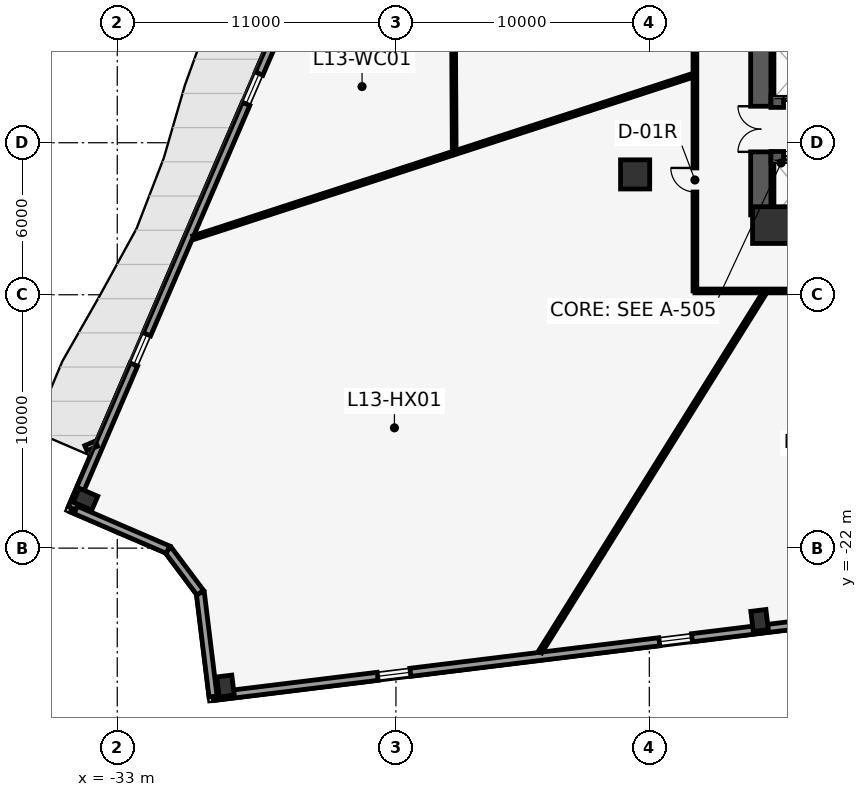
"""IFC4 building model, lengths in metres.
Left out: names, types, materials, properties, quantities, classifications, styles, units other than length and angle.
Written with IfcOpenShell. Run it as: python <this file> out.ifc"""

import sys

from ifc_helpers import new_model, si_unit, direction, frame, frame_2d, origin, origin_2d, place, context, subcontext, project, spatial, rectangle, hollow_rectangle, extrude, element, fill, save


model = new_model("IFC4")
c1 = context("Model", 3, precision=1e-05, world=origin(), true_north=direction((0.0, 1.0)))
c2 = subcontext(c1, "Body", "Model", "MODEL_VIEW")
j1 = project(units=[si_unit("LENGTHUNIT", "METRE"), si_unit("PLANEANGLEUNIT", "RADIAN")], contexts=[c1])
p1 = place(None, origin())
s1 = spatial("IfcSite", under=j1, at=p1, CompositionType="ELEMENT")
p2 = place(p1, origin())
s2 = spatial("IfcBuilding", under=s1, at=p2, CompositionType="ELEMENT")
p3 = place(p2, frame((0.0, 0.0, 62.4)))
s3 = spatial("IfcBuildingStorey", under=s2, at=p3, CompositionType="ELEMENT", Elevation=62.4)
p4 = place(p3, frame((-7.6, -8.85, 0.0), z_axis=(0.0, 0.0, 1.0), x_axis=(0.0, 1.0, 0.0)))
e1 = element("IfcWall", 1, at=p4, inside=s3, PredefinedType="SHEAR", context=c2, shape_type="SweptSolid", body=[
    extrude(rectangle(XDim=8.95, YDim=0.8, at=frame_2d((4.475, 0.0))), origin(), (0.0, 0.0, 1.0), 4.35),
])
p5 = place(p4, frame((2.49, 0.0, 0.0)))
e2 = element("IfcOpeningElement", 2, at=p5, cuts=e1, PredefinedType="OPENING", context=c2, shape_type="SweptSolid", body=[
    extrude(rectangle(XDim=1.8, YDim=2.2, at=frame_2d((0.9, 1.1))), frame((0.0, 0.41, 0.0), z_axis=(0.0, -1.0, 0.0), x_axis=(1.0, 0.0, 0.0)), (0.0, 0.0, 1.0), 0.82),
])
p6 = place(p4, frame((7.4, 0.0, 0.0)))
e3 = element("IfcOpeningElement", 3, at=p6, cuts=e1, PredefinedType="OPENING", context=c2, shape_type="SweptSolid", body=[
    extrude(rectangle(XDim=1.2, YDim=2.15, at=frame_2d((0.6, 1.075))), frame((0.0, 0.41, 0.0), z_axis=(0.0, -1.0, 0.0), x_axis=(1.0, 0.0, 0.0)), (0.0, 0.0, 1.0), 0.82),
])
p7 = place(p3, frame((-7.6, -9.25, 0.0), z_axis=(0.0, 0.0, 1.0), x_axis=(1.0, 0.0, 0.0)))
e4 = element("IfcWall", 4, at=p7, inside=s3, PredefinedType="SHEAR", context=c2, shape_type="SweptSolid", body=[
    extrude(rectangle(XDim=15.2, YDim=0.8, at=frame_2d((7.6, 0.0))), origin(), (0.0, 0.0, 1.0), 4.35),
])
p8 = place(p3, frame((-7.2, -4.38, 0.0), z_axis=(0.0, 0.0, 1.0), x_axis=(1.0, 0.0, 0.0)))
e5 = element("IfcWall", 5, at=p8, inside=s3, PredefinedType="SHEAR", context=c2, shape_type="SweptSolid", body=[
    extrude(rectangle(XDim=14.4, YDim=0.45, at=frame_2d((7.2, 0.0))), origin(), (0.0, 0.0, 1.0), 4.35),
])
p9 = place(p8, frame((0.5, 0.0, 0.0)))
e6 = element("IfcOpeningElement", 6, at=p9, cuts=e5, PredefinedType="OPENING", context=c2, shape_type="SweptSolid", body=[
    extrude(rectangle(XDim=1.1, YDim=2.2, at=frame_2d((0.55, 1.1))), frame((0.0, 0.235, 0.0), z_axis=(0.0, -1.0, 0.0), x_axis=(1.0, 0.0, 0.0)), (0.0, 0.0, 1.0), 0.47),
])
p10 = place(p8, frame((2.55, 0.0, 0.0)))
e7 = element("IfcOpeningElement", 7, at=p10, cuts=e5, PredefinedType="OPENING", context=c2, shape_type="SweptSolid", body=[
    extrude(rectangle(XDim=1.1, YDim=2.2, at=frame_2d((0.55, 1.1))), frame((0.0, 0.235, 0.0), z_axis=(0.0, -1.0, 0.0), x_axis=(1.0, 0.0, 0.0)), (0.0, 0.0, 1.0), 0.47),
])
p11 = place(p8, frame((4.6, 0.0, 0.0)))
e8 = element("IfcOpeningElement", 8, at=p11, cuts=e5, PredefinedType="OPENING", context=c2, shape_type="SweptSolid", body=[
    extrude(rectangle(XDim=1.1, YDim=2.2, at=frame_2d((0.55, 1.1))), frame((0.0, 0.235, 0.0), z_axis=(0.0, -1.0, 0.0), x_axis=(1.0, 0.0, 0.0)), (0.0, 0.0, 1.0), 0.47),
])
p12 = place(p8, frame((6.3, 0.0, 0.0)))
e9 = element("IfcOpeningElement", 9, at=p12, cuts=e5, PredefinedType="OPENING", context=c2, shape_type="SweptSolid", body=[
    extrude(rectangle(XDim=1.1, YDim=2.2, at=frame_2d((0.55, 1.1))), frame((0.0, 0.235, 0.0), z_axis=(0.0, -1.0, 0.0), x_axis=(1.0, 0.0, 0.0)), (0.0, 0.0, 1.0), 0.47),
])
p13 = place(p3, frame((-7.2, -6.57, 0.0), z_axis=(0.0, 0.0, 1.0), x_axis=(1.0, 0.0, 0.0)))
e10 = element("IfcWall", 10, at=p13, inside=s3, PredefinedType="SHEAR", context=c2, shape_type="SweptSolid", body=[
    extrude(rectangle(XDim=14.4, YDim=0.45, at=frame_2d((7.2, 0.0))), origin(), (0.0, 0.0, 1.0), 4.35),
])
p14 = place(p13, frame((0.5, 0.0, 0.0)))
e11 = element("IfcOpeningElement", 11, at=p14, cuts=e10, PredefinedType="OPENING", context=c2, shape_type="SweptSolid", body=[
    extrude(rectangle(XDim=1.1, YDim=2.2, at=frame_2d((0.55, 1.1))), frame((0.0, 0.235, 0.0), z_axis=(0.0, -1.0, 0.0), x_axis=(1.0, 0.0, 0.0)), (0.0, 0.0, 1.0), 0.47),
])
p15 = place(p13, frame((2.55, 0.0, 0.0)))
e12 = element("IfcOpeningElement", 12, at=p15, cuts=e10, PredefinedType="OPENING", context=c2, shape_type="SweptSolid", body=[
    extrude(rectangle(XDim=1.1, YDim=2.2, at=frame_2d((0.55, 1.1))), frame((0.0, 0.235, 0.0), z_axis=(0.0, -1.0, 0.0), x_axis=(1.0, 0.0, 0.0)), (0.0, 0.0, 1.0), 0.47),
])
p16 = place(p13, frame((4.6, 0.0, 0.0)))
e13 = element("IfcOpeningElement", 13, at=p16, cuts=e10, PredefinedType="OPENING", context=c2, shape_type="SweptSolid", body=[
    extrude(rectangle(XDim=1.1, YDim=2.2, at=frame_2d((0.55, 1.1))), frame((0.0, 0.235, 0.0), z_axis=(0.0, -1.0, 0.0), x_axis=(1.0, 0.0, 0.0)), (0.0, 0.0, 1.0), 0.47),
])
p17 = place(p13, frame((6.3, 0.0, 0.0)))
e14 = element("IfcOpeningElement", 14, at=p17, cuts=e10, PredefinedType="OPENING", context=c2, shape_type="SweptSolid", body=[
    extrude(rectangle(XDim=1.1, YDim=2.2, at=frame_2d((0.55, 1.1))), frame((0.0, 0.235, 0.0), z_axis=(0.0, -1.0, 0.0), x_axis=(1.0, 0.0, 0.0)), (0.0, 0.0, 1.0), 0.47),
])
p18 = place(p13, frame((12.91, 0.0, 0.0)))
e15 = element("IfcOpeningElement", 15, at=p18, cuts=e10, PredefinedType="OPENING", context=c2, shape_type="SweptSolid", body=[
    extrude(rectangle(XDim=0.88, YDim=2.15, at=frame_2d((0.44, 1.075))), frame((0.0, 0.235, 0.0), z_axis=(0.0, -1.0, 0.0), x_axis=(1.0, 0.0, 0.0)), (0.0, 0.0, 1.0), 0.47),
])
p19 = place(p3, frame((-7.2, -9.25, 0.0), z_axis=(0.0, 0.0, 1.0), x_axis=(1.0, 0.0, 0.0)))
e16 = element("IfcColumn", 16, at=p19, inside=s3, PredefinedType="COLUMN", context=c2, shape_type="SweptSolid", body=[
    extrude(rectangle(XDim=1.45, YDim=1.45, at=origin_2d()), origin(), (0.0, 0.0, 1.0), 4.6),
])
p20 = place(p3, frame((-12.56, -7.25, 0.0), z_axis=(0.0, 0.0, 1.0), x_axis=(1.0, 0.0, 0.0)))
e17 = element("IfcColumn", 17, at=p20, inside=s3, PredefinedType="COLUMN", context=c2, shape_type="SweptSolid", body=[
    extrude(rectangle(XDim=1.15, YDim=1.15, at=origin_2d()), origin(), (0.0, 0.0, 1.0), 4.6),
])
for number, where, z_axis, x_axis in (
    (18, (-34.255, -20.07, 0.0), (0.0, 0.0, 1.0), (0.396, 0.918, 0.0)),
    (19, (-28.728, -27.444, 0.0), (0.0, 0.0, 1.0), (0.993, 0.122, 0.0)),
    (20, (-7.647, -24.856, 0.0), (0.0, 0.0, 1.0), (0.993, 0.122, 0.0)),
):
    element("IfcColumn", number, at=place(p3, frame(where, z_axis=z_axis, x_axis=x_axis)), inside=s3, PredefinedType="COLUMN", context=c2, shape_type="SweptSolid", body=[
        extrude(hollow_rectangle(XDim=0.6, YDim=0.8, WallThickness=0.05, at=origin_2d()), origin(), (0.0, 0.0, 1.0), 4.6),
    ])
p21 = place(p3, frame((35.091, -19.961, 0.0), z_axis=(0.0, 0.0, 1.0), x_axis=(-0.992546286146, -0.121868247946, 0.0)))
e21 = element("IfcWall", 21, at=p21, inside=s3, PredefinedType="STANDARD", context=c2, shape_type="SweptSolid", body=[
    extrude(rectangle(XDim=64.793, YDim=0.32, at=frame_2d((32.396, 0.0))), origin(), (0.0, 0.0, 1.0), 4.35),
])
p22 = place(p21, frame((12.147, 0.0, 0.85)))
e22 = element("IfcOpeningElement", 22, at=p22, cuts=e21, PredefinedType="OPENING", context=c2, shape_type="SweptSolid", body=[
    extrude(rectangle(XDim=1.3, YDim=2.1, at=frame_2d((0.65, 1.05))), frame((0.0, 0.17, 0.0), z_axis=(0.0, -1.0, 0.0), x_axis=(1.0, 0.0, 0.0)), (0.0, 0.0, 1.0), 0.34),
])
p23 = place(p21, frame((17.747, 0.0, 0.85)))
e23 = element("IfcOpeningElement", 23, at=p23, cuts=e21, PredefinedType="OPENING", context=c2, shape_type="SweptSolid", body=[
    extrude(rectangle(XDim=1.3, YDim=2.1, at=frame_2d((0.65, 1.05))), frame((0.0, 0.17, 0.0), z_axis=(0.0, -1.0, 0.0), x_axis=(1.0, 0.0, 0.0)), (0.0, 0.0, 1.0), 0.34),
])
p24 = place(p21, frame((45.747, 0.0, 0.85)))
e24 = element("IfcOpeningElement", 24, at=p24, cuts=e21, PredefinedType="OPENING", context=c2, shape_type="SweptSolid", body=[
    extrude(rectangle(XDim=1.3, YDim=2.1, at=frame_2d((0.65, 1.05))), frame((0.0, 0.17, 0.0), z_axis=(0.0, -1.0, 0.0), x_axis=(1.0, 0.0, 0.0)), (0.0, 0.0, 1.0), 0.34),
])
p25 = place(p21, frame((56.947, 0.0, 0.85)))
e25 = element("IfcOpeningElement", 25, at=p25, cuts=e21, PredefinedType="OPENING", context=c2, shape_type="SweptSolid", body=[
    extrude(rectangle(XDim=1.3, YDim=2.1, at=frame_2d((0.65, 1.05))), frame((0.0, 0.17, 0.0), z_axis=(0.0, -1.0, 0.0), x_axis=(1.0, 0.0, 0.0)), (0.0, 0.0, 1.0), 0.34),
])
p26 = place(p3, frame((-29.219, -27.857, 0.0), z_axis=(0.0, 0.0, 1.0), x_axis=(-0.121887213021, 0.992543957365, 0.0)))
e26 = element("IfcWall", 26, at=p26, inside=s3, PredefinedType="STANDARD", context=c2, shape_type="SweptSolid", body=[
    extrude(rectangle(XDim=4.128, YDim=0.32, at=frame_2d((2.064, 0.0))), origin(), (0.0, 0.0, 1.0), 4.35),
])
p27 = place(p3, frame((-29.723, -23.76, 0.0), z_axis=(0.0, 0.0, 1.0), x_axis=(-0.59977911486, 0.800165616218, 0.0)))
e27 = element("IfcWall", 27, at=p27, inside=s3, PredefinedType="STANDARD", context=c2, shape_type="SweptSolid", body=[
    extrude(rectangle(XDim=2.122, YDim=0.32, at=frame_2d((1.061, 0.0))), origin(), (0.0, 0.0, 1.0), 4.35),
])
p28 = place(p3, frame((-30.996, -22.062, 0.0), z_axis=(0.0, 0.0, 1.0), x_axis=(-0.918504494871, 0.395410537165, 0.0)))
e28 = element("IfcWall", 28, at=p28, inside=s3, PredefinedType="STANDARD", context=c2, shape_type="SweptSolid", body=[
    extrude(rectangle(XDim=4.128, YDim=0.32, at=frame_2d((2.064, 0.0))), origin(), (0.0, 0.0, 1.0), 4.35),
])
p29 = place(p3, frame((-34.787, -20.429, 0.0), z_axis=(0.0, 0.0, 1.0), x_axis=(0.395418293843, 0.91850115563, 0.0)))
e29 = element("IfcWall", 29, at=p29, inside=s3, PredefinedType="STANDARD", context=c2, shape_type="SweptSolid", body=[
    extrude(rectangle(XDim=64.058, YDim=0.32, at=frame_2d((32.029, 0.0))), origin(), (0.0, 0.0, 1.0), 4.35),
])
p30 = place(p29, frame((23.542, 0.0, 0.0)))
e30 = element("IfcOpeningElement", 30, at=p30, cuts=e29, PredefinedType="OPENING", context=c2, shape_type="SweptSolid", body=[
    extrude(rectangle(XDim=1.6, YDim=2.2, at=frame_2d((0.8, 1.1))), frame((0.0, 0.17, 0.0), z_axis=(0.0, -1.0, 0.0), x_axis=(1.0, 0.0, 0.0)), (0.0, 0.0, 1.0), 0.34),
])
p31 = place(p29, frame((6.179, 0.0, 0.85)))
e31 = element("IfcOpeningElement", 31, at=p31, cuts=e29, PredefinedType="OPENING", context=c2, shape_type="SweptSolid", body=[
    extrude(rectangle(XDim=1.3, YDim=2.1, at=frame_2d((0.65, 1.05))), frame((0.0, 0.17, 0.0), z_axis=(0.0, -1.0, 0.0), x_axis=(1.0, 0.0, 0.0)), (0.0, 0.0, 1.0), 0.34),
])
p32 = place(p29, frame((17.379, 0.0, 0.85)))
e32 = element("IfcOpeningElement", 32, at=p32, cuts=e29, PredefinedType="OPENING", context=c2, shape_type="SweptSolid", body=[
    extrude(rectangle(XDim=1.3, YDim=2.1, at=frame_2d((0.65, 1.05))), frame((0.0, 0.17, 0.0), z_axis=(0.0, -1.0, 0.0), x_axis=(1.0, 0.0, 0.0)), (0.0, 0.0, 1.0), 0.34),
])
p33 = place(p29, frame((45.379, 0.0, 0.85)))
e33 = element("IfcOpeningElement", 33, at=p33, cuts=e29, PredefinedType="OPENING", context=c2, shape_type="SweptSolid", body=[
    extrude(rectangle(XDim=1.3, YDim=2.1, at=frame_2d((0.65, 1.05))), frame((0.0, 0.17, 0.0), z_axis=(0.0, -1.0, 0.0), x_axis=(1.0, 0.0, 0.0)), (0.0, 0.0, 1.0), 0.34),
])
p34 = place(p29, frame((50.979, 0.0, 0.85)))
e34 = element("IfcOpeningElement", 34, at=p34, cuts=e29, PredefinedType="OPENING", context=c2, shape_type="SweptSolid", body=[
    extrude(rectangle(XDim=1.3, YDim=2.1, at=frame_2d((0.65, 1.05))), frame((0.0, 0.17, 0.0), z_axis=(0.0, -1.0, 0.0), x_axis=(1.0, 0.0, 0.0)), (0.0, 0.0, 1.0), 0.34),
])
p35 = place(p29, frame((56.579, 0.0, 0.85)))
e35 = element("IfcOpeningElement", 35, at=p35, cuts=e29, PredefinedType="OPENING", context=c2, shape_type="SweptSolid", body=[
    extrude(rectangle(XDim=1.3, YDim=2.1, at=frame_2d((0.65, 1.05))), frame((0.0, 0.17, 0.0), z_axis=(0.0, -1.0, 0.0), x_axis=(1.0, 0.0, 0.0)), (0.0, 0.0, 1.0), 0.34),
])
p36 = place(p3, frame((10.2, -11.85, 0.0), z_axis=(0.0, 0.0, 1.0), x_axis=(-1.0, 0.0, 0.0)))
e36 = element("IfcWall", 36, at=p36, inside=s3, PredefinedType="PARTITIONING", context=c2, shape_type="SweptSolid", body=[
    extrude(rectangle(XDim=20.4, YDim=0.15, at=frame_2d((10.2, 0.0))), origin(), (0.0, 0.0, 1.0), 4.35),
])
p37 = place(p36, frame((12.406, 0.0, 0.0)))
e37 = element("IfcOpeningElement", 37, at=p37, cuts=e36, PredefinedType="OPENING", context=c2, shape_type="SweptSolid", body=[
    extrude(rectangle(XDim=0.95, YDim=2.15, at=frame_2d((0.475, 1.075))), frame((0.0, 0.085, 0.0), z_axis=(0.0, -1.0, 0.0), x_axis=(1.0, 0.0, 0.0)), (0.0, 0.0, 1.0), 0.17),
])
p38 = place(p36, frame((3.701, 0.0, 0.0)))
e38 = element("IfcOpeningElement", 38, at=p38, cuts=e36, PredefinedType="OPENING", context=c2, shape_type="SweptSolid", body=[
    extrude(rectangle(XDim=0.95, YDim=2.15, at=frame_2d((0.475, 1.075))), frame((0.0, 0.085, 0.0), z_axis=(0.0, -1.0, 0.0), x_axis=(1.0, 0.0, 0.0)), (0.0, 0.0, 1.0), 0.17),
])
p39 = place(p3, frame((-10.2, -11.85, 0.0), z_axis=(0.0, 0.0, 1.0), x_axis=(0.0, 1.0, 0.0)))
e39 = element("IfcWall", 39, at=p39, inside=s3, PredefinedType="PARTITIONING", context=c2, shape_type="SweptSolid", body=[
    extrude(rectangle(XDim=24.0, YDim=0.15, at=frame_2d((12.0, 0.0))), origin(), (0.0, 0.0, 1.0), 4.35),
])
p40 = place(p39, frame((11.995, 0.0, 0.0)))
e40 = element("IfcOpeningElement", 40, at=p40, cuts=e39, PredefinedType="OPENING", context=c2, shape_type="SweptSolid", body=[
    extrude(rectangle(XDim=0.95, YDim=2.15, at=frame_2d((0.475, 1.075))), frame((0.0, 0.085, 0.0), z_axis=(0.0, -1.0, 0.0), x_axis=(1.0, 0.0, 0.0)), (0.0, 0.0, 1.0), 0.17),
])
p41 = place(p39, frame((3.905, 0.0, 0.0)))
e41 = element("IfcOpeningElement", 41, at=p41, cuts=e39, PredefinedType="OPENING", context=c2, shape_type="SweptSolid", body=[
    extrude(rectangle(XDim=0.95, YDim=2.15, at=frame_2d((0.475, 1.075))), frame((0.0, 0.085, 0.0), z_axis=(0.0, -1.0, 0.0), x_axis=(1.0, 0.0, 0.0)), (0.0, 0.0, 1.0), 0.17),
])
p42 = place(p39, frame((19.615, 0.0, 0.0)))
e42 = element("IfcOpeningElement", 42, at=p42, cuts=e39, PredefinedType="OPENING", context=c2, shape_type="SweptSolid", body=[
    extrude(rectangle(XDim=0.95, YDim=2.15, at=frame_2d((0.475, 1.075))), frame((0.0, 0.085, 0.0), z_axis=(0.0, -1.0, 0.0), x_axis=(1.0, 0.0, 0.0)), (0.0, 0.0, 1.0), 0.17),
])
p43 = place(p3, frame((-10.305, -3.348, 0.0), z_axis=(0.0, 0.0, 1.0), x_axis=(-0.951058846739, -0.309009821915, 0.0)))
e43 = element("IfcWall", 43, at=p43, inside=s3, PredefinedType="PARTITIONING", context=c2, shape_type="SweptSolid", body=[
    extrude(rectangle(XDim=20.706, YDim=0.15, at=frame_2d((10.353, 0.0))), origin(), (0.0, 0.0, 1.0), 4.35),
])
p44 = place(p3, frame((-7.47, -11.955, 0.0), z_axis=(0.0, 0.0, 1.0), x_axis=(-0.529931816238, -0.848040252664, 0.0)))
e44 = element("IfcWall", 44, at=p44, inside=s3, PredefinedType="PARTITIONING", context=c2, shape_type="SweptSolid", body=[
    extrude(rectangle(XDim=16.674, YDim=0.15, at=frame_2d((8.337, 0.0))), origin(), (0.0, 0.0, 1.0), 4.35),
])
p45 = place(p3, frame((-19.784, 8.781, 0.0), z_axis=(0.0, 0.0, 1.0), x_axis=(0.005476810205, -0.999985002163, 0.0)))
e45 = element("IfcWall", 45, at=p45, inside=s3, PredefinedType="PARTITIONING", context=c2, shape_type="SweptSolid", body=[
    extrude(rectangle(XDim=15.156, YDim=0.15, at=frame_2d((7.578, 0.0))), origin(), (0.0, 0.0, 1.0), 4.35),
])
p46 = place(p45, frame((7.103, 0.0, 0.0)))
e46 = element("IfcOpeningElement", 46, at=p46, cuts=e45, PredefinedType="OPENING", context=c2, shape_type="SweptSolid", body=[
    extrude(rectangle(XDim=0.95, YDim=2.15, at=frame_2d((0.475, 1.075))), frame((0.0, 0.085, 0.0), z_axis=(0.0, -1.0, 0.0), x_axis=(1.0, 0.0, 0.0)), (0.0, 0.0, 1.0), 0.17),
])
p47 = place(p24, origin())
e47 = element("IfcWindow", 47, at=p47, inside=s3, PartitioningType="SINGLE_PANEL", PredefinedType="WINDOW", context=c2, shape_type="SweptSolid", body=[
    extrude(rectangle(XDim=1.3, YDim=2.1, at=frame_2d((0.65, 1.05))), frame((0.0, 0.03, 0.0), z_axis=(0.0, -1.0, 0.0), x_axis=(1.0, 0.0, 0.0)), (0.0, 0.0, 1.0), 0.06),
])
fill(e24, e47)
p48 = place(p25, origin())
e48 = element("IfcWindow", 48, at=p48, inside=s3, PartitioningType="SINGLE_PANEL", PredefinedType="WINDOW", context=c2, shape_type="SweptSolid", body=[
    extrude(rectangle(XDim=1.3, YDim=2.1, at=frame_2d((0.65, 1.05))), frame((0.0, 0.03, 0.0), z_axis=(0.0, -1.0, 0.0), x_axis=(1.0, 0.0, 0.0)), (0.0, 0.0, 1.0), 0.06),
])
fill(e25, e48)
p49 = place(p31, origin())
e49 = element("IfcWindow", 49, at=p49, inside=s3, PartitioningType="SINGLE_PANEL", PredefinedType="WINDOW", context=c2, shape_type="SweptSolid", body=[
    extrude(rectangle(XDim=1.3, YDim=2.1, at=frame_2d((0.65, 1.05))), frame((0.0, 0.03, 0.0), z_axis=(0.0, -1.0, 0.0), x_axis=(1.0, 0.0, 0.0)), (0.0, 0.0, 1.0), 0.06),
])
fill(e31, e49)
p50 = place(p32, origin())
e50 = element("IfcWindow", 50, at=p50, inside=s3, PartitioningType="SINGLE_PANEL", PredefinedType="WINDOW", context=c2, shape_type="SweptSolid", body=[
    extrude(rectangle(XDim=1.3, YDim=2.1, at=frame_2d((0.65, 1.05))), frame((0.0, 0.03, 0.0), z_axis=(0.0, -1.0, 0.0), x_axis=(1.0, 0.0, 0.0)), (0.0, 0.0, 1.0), 0.06),
])
fill(e32, e50)
p51 = place(p9, origin())
e51 = element("IfcDoor", 51, at=p51, inside=s3, OperationType="DOUBLE_DOOR_SLIDING", PredefinedType="DOOR", context=c2, shape_type="SweptSolid", body=[
    extrude(rectangle(XDim=1.1, YDim=2.2, at=frame_2d((0.55, 1.1))), frame((0.0, 0.025, 0.0), z_axis=(0.0, -1.0, 0.0), x_axis=(1.0, 0.0, 0.0)), (0.0, 0.0, 1.0), 0.05),
])
fill(e6, e51)
p52 = place(p14, origin())
e52 = element("IfcDoor", 52, at=p52, inside=s3, OperationType="DOUBLE_DOOR_SLIDING", PredefinedType="DOOR", context=c2, shape_type="SweptSolid", body=[
    extrude(rectangle(XDim=1.1, YDim=2.2, at=frame_2d((0.55, 1.1))), frame((0.0, 0.025, 0.0), z_axis=(0.0, -1.0, 0.0), x_axis=(1.0, 0.0, 0.0)), (0.0, 0.0, 1.0), 0.05),
])
fill(e11, e52)
p53 = place(p5, origin())
e53 = element("IfcDoor", 53, at=p53, inside=s3, OperationType="DOUBLE_DOOR_SINGLE_SWING", PredefinedType="DOOR", context=c2, shape_type="SweptSolid", body=[
    extrude(rectangle(XDim=1.8, YDim=2.2, at=frame_2d((0.9, 1.1))), frame((0.0, 0.025, 0.0), z_axis=(0.0, -1.0, 0.0), x_axis=(1.0, 0.0, 0.0)), (0.0, 0.0, 1.0), 0.05),
])
fill(e2, e53)
p54 = place(p41, origin())
e54 = element("IfcDoor", 54, at=p54, inside=s3, OperationType="SINGLE_SWING_RIGHT", PredefinedType="DOOR", context=c2, shape_type="SweptSolid", body=[
    extrude(rectangle(XDim=0.95, YDim=2.15, at=frame_2d((0.475, 1.075))), frame((0.0, 0.025, 0.0), z_axis=(0.0, -1.0, 0.0), x_axis=(1.0, 0.0, 0.0)), (0.0, 0.0, 1.0), 0.05),
])
fill(e41, e54)
save(model, sys.argv[1])
